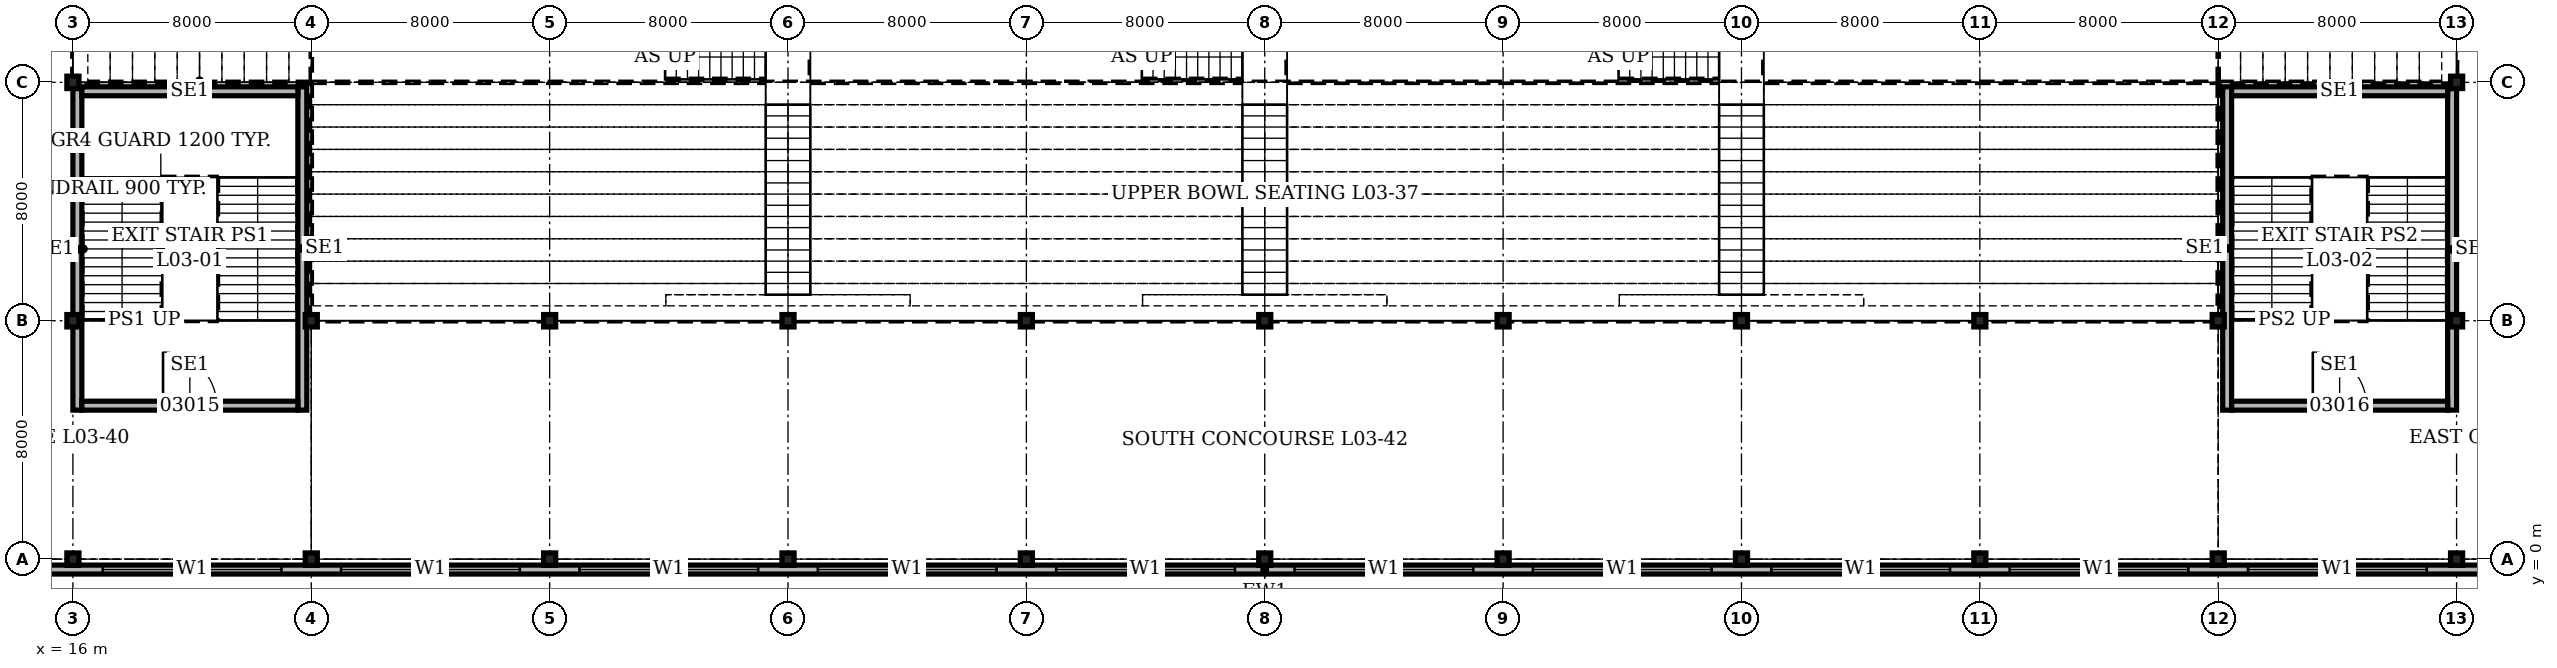
"""IFC4 building model, lengths in metres.
Left out: names, types, materials, properties, quantities, classifications, styles, units other than length and angle.
Written with IfcOpenShell. Run it as: python <this file> out.ifc"""

import sys

from ifc_helpers import new_model, si_unit, direction, frame, frame_2d, origin, origin_2d, place, context, subcontext, project, spatial, rectangle, i_section, extrude, element, fill, save


model = new_model("IFC4")
c1 = context("Model", 3, precision=1e-05, world=origin(), true_north=direction((0.0, 1.0)))
c2 = subcontext(c1, "Body", "Model", "MODEL_VIEW")
j1 = project(units=[si_unit("LENGTHUNIT", "METRE"), si_unit("PLANEANGLEUNIT", "RADIAN")], contexts=[c1])
p1 = place(None, origin())
s1 = spatial("IfcSite", under=j1, at=p1, CompositionType="ELEMENT")
p2 = place(p1, origin())
s2 = spatial("IfcBuilding", under=s1, at=p2, CompositionType="ELEMENT")
p3 = place(p2, frame((0.0, 0.0, 14.9)))
s3 = spatial("IfcBuildingStorey", under=s2, at=p3, CompositionType="ELEMENT", Elevation=14.9)
for number, where, z_axis, x_axis in (
    (1, (16.0, 0.0, 0.0), (0.0, 0.0, 1.0), (1.0, 0.0, 0.0)),
    (2, (16.0, 8.0, 0.0), (0.0, 0.0, 1.0), (1.0, 0.0, 0.0)),
    (3, (16.0, 16.0, 0.0), (0.0, 0.0, 1.0), (1.0, 0.0, 0.0)),
    (4, (24.0, 0.0, 0.0), (0.0, 0.0, 1.0), (1.0, 0.0, 0.0)),
    (5, (24.0, 8.0, 0.0), (0.0, 0.0, 1.0), (1.0, 0.0, 0.0)),
    (6, (32.0, 0.0, 0.0), (0.0, 0.0, 1.0), (1.0, 0.0, 0.0)),
    (7, (32.0, 8.0, 0.0), (0.0, 0.0, 1.0), (1.0, 0.0, 0.0)),
    (8, (40.0, 0.0, 0.0), (0.0, 0.0, 1.0), (1.0, 0.0, 0.0)),
    (9, (40.0, 8.0, 0.0), (0.0, 0.0, 1.0), (1.0, 0.0, 0.0)),
    (10, (48.0, 0.0, 0.0), (0.0, 0.0, 1.0), (1.0, 0.0, 0.0)),
    (11, (48.0, 8.0, 0.0), (0.0, 0.0, 1.0), (1.0, 0.0, 0.0)),
    (12, (56.0, 0.0, 0.0), (0.0, 0.0, 1.0), (1.0, 0.0, 0.0)),
    (13, (56.0, 8.0, 0.0), (0.0, 0.0, 1.0), (1.0, 0.0, 0.0)),
    (14, (64.0, 0.0, 0.0), (0.0, 0.0, 1.0), (1.0, 0.0, 0.0)),
    (15, (64.0, 8.0, 0.0), (0.0, 0.0, 1.0), (1.0, 0.0, 0.0)),
    (16, (72.0, 0.0, 0.0), (0.0, 0.0, 1.0), (1.0, 0.0, 0.0)),
    (17, (72.0, 8.0, 0.0), (0.0, 0.0, 1.0), (1.0, 0.0, 0.0)),
    (18, (80.0, 0.0, 0.0), (0.0, 0.0, 1.0), (1.0, 0.0, 0.0)),
    (19, (80.0, 8.0, 0.0), (0.0, 0.0, 1.0), (1.0, 0.0, 0.0)),
    (20, (88.0, 0.0, 0.0), (0.0, 0.0, 1.0), (1.0, 0.0, 0.0)),
    (21, (88.0, 8.0, 0.0), (0.0, 0.0, 1.0), (1.0, 0.0, 0.0)),
    (22, (96.0, 0.0, 0.0), (0.0, 0.0, 1.0), (1.0, 0.0, 0.0)),
    (23, (96.0, 8.0, 0.0), (0.0, 0.0, 1.0), (1.0, 0.0, 0.0)),
    (24, (96.0, 16.0, 0.0), (0.0, 0.0, 1.0), (1.0, 0.0, 0.0)),
):
    element("IfcColumn", number, at=place(p3, frame(where, z_axis=z_axis, x_axis=x_axis)), inside=s3, PredefinedType="COLUMN", context=c2, shape_type="SweptSolid", body=[
        extrude(i_section(OverallWidth=0.406, OverallDepth=0.417, WebThickness=0.03, FlangeThickness=0.048, at=origin_2d()), origin(), (0.0, 0.0, 1.0), 5.0),
    ])
p4 = place(p3, frame((-0.35, -0.35, 0.0), z_axis=(0.0, 0.0, 1.0), x_axis=(1.0, 0.0, 0.0)))
e25 = element("IfcWall", 25, at=p4, inside=s3, PredefinedType="SOLIDWALL", context=c2, shape_type="SweptSolid", body=[
    extrude(rectangle(XDim=112.7, YDim=0.3, at=frame_2d((56.35, 0.0))), origin(), (0.0, 0.0, 1.0), 5.0),
])
p5 = place(p4, frame((1.35, 0.0, 1.0)))
e26 = element("IfcOpeningElement", 26, at=p5, cuts=e25, PredefinedType="OPENING", context=c2, shape_type="SweptSolid", body=[
    extrude(rectangle(XDim=6.0, YDim=1.5, at=frame_2d((3.0, 0.75))), frame((0.0, 0.16, 0.0), z_axis=(0.0, -1.0, 0.0), x_axis=(1.0, 0.0, 0.0)), (0.0, 0.0, 1.0), 0.32),
])
p6 = place(p4, frame((9.35, 0.0, 1.0)))
e27 = element("IfcOpeningElement", 27, at=p6, cuts=e25, PredefinedType="OPENING", context=c2, shape_type="SweptSolid", body=[
    extrude(rectangle(XDim=6.0, YDim=1.5, at=frame_2d((3.0, 0.75))), frame((0.0, 0.16, 0.0), z_axis=(0.0, -1.0, 0.0), x_axis=(1.0, 0.0, 0.0)), (0.0, 0.0, 1.0), 0.32),
])
p7 = place(p4, frame((17.35, 0.0, 1.0)))
e28 = element("IfcOpeningElement", 28, at=p7, cuts=e25, PredefinedType="OPENING", context=c2, shape_type="SweptSolid", body=[
    extrude(rectangle(XDim=6.0, YDim=1.5, at=frame_2d((3.0, 0.75))), frame((0.0, 0.16, 0.0), z_axis=(0.0, -1.0, 0.0), x_axis=(1.0, 0.0, 0.0)), (0.0, 0.0, 1.0), 0.32),
])
p8 = place(p4, frame((25.35, 0.0, 1.0)))
e29 = element("IfcOpeningElement", 29, at=p8, cuts=e25, PredefinedType="OPENING", context=c2, shape_type="SweptSolid", body=[
    extrude(rectangle(XDim=6.0, YDim=1.5, at=frame_2d((3.0, 0.75))), frame((0.0, 0.16, 0.0), z_axis=(0.0, -1.0, 0.0), x_axis=(1.0, 0.0, 0.0)), (0.0, 0.0, 1.0), 0.32),
])
p9 = place(p4, frame((33.35, 0.0, 1.0)))
e30 = element("IfcOpeningElement", 30, at=p9, cuts=e25, PredefinedType="OPENING", context=c2, shape_type="SweptSolid", body=[
    extrude(rectangle(XDim=6.0, YDim=1.5, at=frame_2d((3.0, 0.75))), frame((0.0, 0.16, 0.0), z_axis=(0.0, -1.0, 0.0), x_axis=(1.0, 0.0, 0.0)), (0.0, 0.0, 1.0), 0.32),
])
p10 = place(p4, frame((41.35, 0.0, 1.0)))
e31 = element("IfcOpeningElement", 31, at=p10, cuts=e25, PredefinedType="OPENING", context=c2, shape_type="SweptSolid", body=[
    extrude(rectangle(XDim=6.0, YDim=1.5, at=frame_2d((3.0, 0.75))), frame((0.0, 0.16, 0.0), z_axis=(0.0, -1.0, 0.0), x_axis=(1.0, 0.0, 0.0)), (0.0, 0.0, 1.0), 0.32),
])
p11 = place(p4, frame((49.35, 0.0, 1.0)))
e32 = element("IfcOpeningElement", 32, at=p11, cuts=e25, PredefinedType="OPENING", context=c2, shape_type="SweptSolid", body=[
    extrude(rectangle(XDim=6.0, YDim=1.5, at=frame_2d((3.0, 0.75))), frame((0.0, 0.16, 0.0), z_axis=(0.0, -1.0, 0.0), x_axis=(1.0, 0.0, 0.0)), (0.0, 0.0, 1.0), 0.32),
])
p12 = place(p4, frame((57.35, 0.0, 1.0)))
e33 = element("IfcOpeningElement", 33, at=p12, cuts=e25, PredefinedType="OPENING", context=c2, shape_type="SweptSolid", body=[
    extrude(rectangle(XDim=6.0, YDim=1.5, at=frame_2d((3.0, 0.75))), frame((0.0, 0.16, 0.0), z_axis=(0.0, -1.0, 0.0), x_axis=(1.0, 0.0, 0.0)), (0.0, 0.0, 1.0), 0.32),
])
p13 = place(p4, frame((65.35, 0.0, 1.0)))
e34 = element("IfcOpeningElement", 34, at=p13, cuts=e25, PredefinedType="OPENING", context=c2, shape_type="SweptSolid", body=[
    extrude(rectangle(XDim=6.0, YDim=1.5, at=frame_2d((3.0, 0.75))), frame((0.0, 0.16, 0.0), z_axis=(0.0, -1.0, 0.0), x_axis=(1.0, 0.0, 0.0)), (0.0, 0.0, 1.0), 0.32),
])
p14 = place(p4, frame((73.35, 0.0, 1.0)))
e35 = element("IfcOpeningElement", 35, at=p14, cuts=e25, PredefinedType="OPENING", context=c2, shape_type="SweptSolid", body=[
    extrude(rectangle(XDim=6.0, YDim=1.5, at=frame_2d((3.0, 0.75))), frame((0.0, 0.16, 0.0), z_axis=(0.0, -1.0, 0.0), x_axis=(1.0, 0.0, 0.0)), (0.0, 0.0, 1.0), 0.32),
])
p15 = place(p4, frame((81.35, 0.0, 1.0)))
e36 = element("IfcOpeningElement", 36, at=p15, cuts=e25, PredefinedType="OPENING", context=c2, shape_type="SweptSolid", body=[
    extrude(rectangle(XDim=6.0, YDim=1.5, at=frame_2d((3.0, 0.75))), frame((0.0, 0.16, 0.0), z_axis=(0.0, -1.0, 0.0), x_axis=(1.0, 0.0, 0.0)), (0.0, 0.0, 1.0), 0.32),
])
p16 = place(p4, frame((89.35, 0.0, 1.0)))
e37 = element("IfcOpeningElement", 37, at=p16, cuts=e25, PredefinedType="OPENING", context=c2, shape_type="SweptSolid", body=[
    extrude(rectangle(XDim=6.0, YDim=1.5, at=frame_2d((3.0, 0.75))), frame((0.0, 0.16, 0.0), z_axis=(0.0, -1.0, 0.0), x_axis=(1.0, 0.0, 0.0)), (0.0, 0.0, 1.0), 0.32),
])
p17 = place(p4, frame((97.35, 0.0, 1.0)))
e38 = element("IfcOpeningElement", 38, at=p17, cuts=e25, PredefinedType="OPENING", context=c2, shape_type="SweptSolid", body=[
    extrude(rectangle(XDim=6.0, YDim=1.5, at=frame_2d((3.0, 0.75))), frame((0.0, 0.16, 0.0), z_axis=(0.0, -1.0, 0.0), x_axis=(1.0, 0.0, 0.0)), (0.0, 0.0, 1.0), 0.32),
])
p18 = place(p4, frame((105.35, 0.0, 1.0)))
e39 = element("IfcOpeningElement", 39, at=p18, cuts=e25, PredefinedType="OPENING", context=c2, shape_type="SweptSolid", body=[
    extrude(rectangle(XDim=6.0, YDim=1.5, at=frame_2d((3.0, 0.75))), frame((0.0, 0.16, 0.0), z_axis=(0.0, -1.0, 0.0), x_axis=(1.0, 0.0, 0.0)), (0.0, 0.0, 1.0), 0.32),
])
p19 = place(p3, frame((16.15, 5.0, 0.0), z_axis=(0.0, 0.0, 1.0), x_axis=(0.0, 1.0, 0.0)))
e40 = element("IfcWall", 40, at=p19, inside=s3, PredefinedType="SOLIDWALL", context=c2, shape_type="SweptSolid", body=[
    extrude(rectangle(XDim=10.792, YDim=0.3, at=frame_2d((5.396, 0.0))), origin(), (0.0, 0.0, 1.0), 4.8),
])
p20 = place(p3, frame((23.7, 5.0, 0.0), z_axis=(0.0, 0.0, 1.0), x_axis=(0.0, 1.0, 0.0)))
e41 = element("IfcWall", 41, at=p20, inside=s3, PredefinedType="SOLIDWALL", context=c2, shape_type="SweptSolid", body=[
    extrude(rectangle(XDim=10.85, YDim=0.3, at=frame_2d((5.425, 0.0))), origin(), (0.0, 0.0, 1.0), 4.8),
])
p21 = place(p3, frame((16.3, 5.15, 0.0), z_axis=(0.0, 0.0, 1.0), x_axis=(1.0, 0.0, 0.0)))
e42 = element("IfcWall", 42, at=p21, inside=s3, PredefinedType="SOLIDWALL", context=c2, shape_type="SweptSolid", body=[
    extrude(rectangle(XDim=7.25, YDim=0.3, at=frame_2d((3.625, 0.0))), origin(), (0.0, 0.0, 1.0), 4.8),
])
p22 = place(p21, frame((2.725, 0.0, 0.0)))
e43 = element("IfcOpeningElement", 43, at=p22, cuts=e42, PredefinedType="OPENING", context=c2, shape_type="SweptSolid", body=[
    extrude(rectangle(XDim=1.8, YDim=2.1, at=frame_2d((0.9, 1.05))), frame((0.0, 0.16, 0.0), z_axis=(0.0, -1.0, 0.0), x_axis=(1.0, 0.0, 0.0)), (0.0, 0.0, 1.0), 0.32),
])
p23 = place(p3, frame((16.3, 15.7, 0.0), z_axis=(0.0, 0.0, 1.0), x_axis=(1.0, 0.0, 0.0)))
e44 = element("IfcWall", 44, at=p23, inside=s3, PredefinedType="SOLIDWALL", context=c2, shape_type="SweptSolid", body=[
    extrude(rectangle(XDim=7.25, YDim=0.3, at=frame_2d((3.625, 0.0))), origin(), (0.0, 0.0, 1.0), 4.8),
])
p24 = place(p3, frame((88.3, 5.0, 0.0), z_axis=(0.0, 0.0, 1.0), x_axis=(0.0, 1.0, 0.0)))
e45 = element("IfcWall", 45, at=p24, inside=s3, PredefinedType="SOLIDWALL", context=c2, shape_type="SweptSolid", body=[
    extrude(rectangle(XDim=10.85, YDim=0.3, at=frame_2d((5.425, 0.0))), origin(), (0.0, 0.0, 1.0), 4.8),
])
p25 = place(p3, frame((95.85, 5.0, 0.0), z_axis=(0.0, 0.0, 1.0), x_axis=(0.0, 1.0, 0.0)))
e46 = element("IfcWall", 46, at=p25, inside=s3, PredefinedType="SOLIDWALL", context=c2, shape_type="SweptSolid", body=[
    extrude(rectangle(XDim=10.792, YDim=0.3, at=frame_2d((5.396, 0.0))), origin(), (0.0, 0.0, 1.0), 4.8),
])
p26 = place(p3, frame((88.45, 5.15, 0.0), z_axis=(0.0, 0.0, 1.0), x_axis=(1.0, 0.0, 0.0)))
e47 = element("IfcWall", 47, at=p26, inside=s3, PredefinedType="SOLIDWALL", context=c2, shape_type="SweptSolid", body=[
    extrude(rectangle(XDim=7.25, YDim=0.3, at=frame_2d((3.625, 0.0))), origin(), (0.0, 0.0, 1.0), 4.8),
])
p27 = place(p26, frame((2.725, 0.0, 0.0)))
e48 = element("IfcOpeningElement", 48, at=p27, cuts=e47, PredefinedType="OPENING", context=c2, shape_type="SweptSolid", body=[
    extrude(rectangle(XDim=1.8, YDim=2.1, at=frame_2d((0.9, 1.05))), frame((0.0, 0.16, 0.0), z_axis=(0.0, -1.0, 0.0), x_axis=(1.0, 0.0, 0.0)), (0.0, 0.0, 1.0), 0.32),
])
p28 = place(p3, frame((88.45, 15.7, 0.0), z_axis=(0.0, 0.0, 1.0), x_axis=(1.0, 0.0, 0.0)))
e49 = element("IfcWall", 49, at=p28, inside=s3, PredefinedType="SOLIDWALL", context=c2, shape_type="SweptSolid", body=[
    extrude(rectangle(XDim=7.25, YDim=0.3, at=frame_2d((3.625, 0.0))), origin(), (0.0, 0.0, 1.0), 4.8),
])
p29 = place(p7, origin())
e50 = element("IfcWindow", 50, at=p29, inside=s3, PartitioningType="SINGLE_PANEL", PredefinedType="WINDOW", context=c2, shape_type="SweptSolid", body=[
    extrude(rectangle(XDim=6.0, YDim=1.5, at=frame_2d((3.0, 0.75))), frame((0.0, 0.03, 0.0), z_axis=(0.0, -1.0, 0.0), x_axis=(1.0, 0.0, 0.0)), (0.0, 0.0, 1.0), 0.06),
])
fill(e28, e50)
p30 = place(p8, origin())
e51 = element("IfcWindow", 51, at=p30, inside=s3, PartitioningType="SINGLE_PANEL", PredefinedType="WINDOW", context=c2, shape_type="SweptSolid", body=[
    extrude(rectangle(XDim=6.0, YDim=1.5, at=frame_2d((3.0, 0.75))), frame((0.0, 0.03, 0.0), z_axis=(0.0, -1.0, 0.0), x_axis=(1.0, 0.0, 0.0)), (0.0, 0.0, 1.0), 0.06),
])
fill(e29, e51)
p31 = place(p9, origin())
e52 = element("IfcWindow", 52, at=p31, inside=s3, PartitioningType="SINGLE_PANEL", PredefinedType="WINDOW", context=c2, shape_type="SweptSolid", body=[
    extrude(rectangle(XDim=6.0, YDim=1.5, at=frame_2d((3.0, 0.75))), frame((0.0, 0.03, 0.0), z_axis=(0.0, -1.0, 0.0), x_axis=(1.0, 0.0, 0.0)), (0.0, 0.0, 1.0), 0.06),
])
fill(e30, e52)
p32 = place(p10, origin())
e53 = element("IfcWindow", 53, at=p32, inside=s3, PartitioningType="SINGLE_PANEL", PredefinedType="WINDOW", context=c2, shape_type="SweptSolid", body=[
    extrude(rectangle(XDim=6.0, YDim=1.5, at=frame_2d((3.0, 0.75))), frame((0.0, 0.03, 0.0), z_axis=(0.0, -1.0, 0.0), x_axis=(1.0, 0.0, 0.0)), (0.0, 0.0, 1.0), 0.06),
])
fill(e31, e53)
p33 = place(p11, origin())
e54 = element("IfcWindow", 54, at=p33, inside=s3, PartitioningType="SINGLE_PANEL", PredefinedType="WINDOW", context=c2, shape_type="SweptSolid", body=[
    extrude(rectangle(XDim=6.0, YDim=1.5, at=frame_2d((3.0, 0.75))), frame((0.0, 0.03, 0.0), z_axis=(0.0, -1.0, 0.0), x_axis=(1.0, 0.0, 0.0)), (0.0, 0.0, 1.0), 0.06),
])
fill(e32, e54)
p34 = place(p12, origin())
e55 = element("IfcWindow", 55, at=p34, inside=s3, PartitioningType="SINGLE_PANEL", PredefinedType="WINDOW", context=c2, shape_type="SweptSolid", body=[
    extrude(rectangle(XDim=6.0, YDim=1.5, at=frame_2d((3.0, 0.75))), frame((0.0, 0.03, 0.0), z_axis=(0.0, -1.0, 0.0), x_axis=(1.0, 0.0, 0.0)), (0.0, 0.0, 1.0), 0.06),
])
fill(e33, e55)
p35 = place(p13, origin())
e56 = element("IfcWindow", 56, at=p35, inside=s3, PartitioningType="SINGLE_PANEL", PredefinedType="WINDOW", context=c2, shape_type="SweptSolid", body=[
    extrude(rectangle(XDim=6.0, YDim=1.5, at=frame_2d((3.0, 0.75))), frame((0.0, 0.03, 0.0), z_axis=(0.0, -1.0, 0.0), x_axis=(1.0, 0.0, 0.0)), (0.0, 0.0, 1.0), 0.06),
])
fill(e34, e56)
p36 = place(p14, origin())
e57 = element("IfcWindow", 57, at=p36, inside=s3, PartitioningType="SINGLE_PANEL", PredefinedType="WINDOW", context=c2, shape_type="SweptSolid", body=[
    extrude(rectangle(XDim=6.0, YDim=1.5, at=frame_2d((3.0, 0.75))), frame((0.0, 0.03, 0.0), z_axis=(0.0, -1.0, 0.0), x_axis=(1.0, 0.0, 0.0)), (0.0, 0.0, 1.0), 0.06),
])
fill(e35, e57)
p37 = place(p15, origin())
e58 = element("IfcWindow", 58, at=p37, inside=s3, PartitioningType="SINGLE_PANEL", PredefinedType="WINDOW", context=c2, shape_type="SweptSolid", body=[
    extrude(rectangle(XDim=6.0, YDim=1.5, at=frame_2d((3.0, 0.75))), frame((0.0, 0.03, 0.0), z_axis=(0.0, -1.0, 0.0), x_axis=(1.0, 0.0, 0.0)), (0.0, 0.0, 1.0), 0.06),
])
fill(e36, e58)
p38 = place(p16, origin())
e59 = element("IfcWindow", 59, at=p38, inside=s3, PartitioningType="SINGLE_PANEL", PredefinedType="WINDOW", context=c2, shape_type="SweptSolid", body=[
    extrude(rectangle(XDim=6.0, YDim=1.5, at=frame_2d((3.0, 0.75))), frame((0.0, 0.03, 0.0), z_axis=(0.0, -1.0, 0.0), x_axis=(1.0, 0.0, 0.0)), (0.0, 0.0, 1.0), 0.06),
])
fill(e37, e59)
p39 = place(p22, origin())
e60 = element("IfcDoor", 60, at=p39, inside=s3, OperationType="DOUBLE_DOOR_SINGLE_SWING", PredefinedType="DOOR", context=c2, shape_type="SweptSolid", body=[
    extrude(rectangle(XDim=1.8, YDim=2.1, at=frame_2d((0.9, 1.05))), frame((0.0, 0.15, 0.0), z_axis=(0.0, -1.0, 0.0), x_axis=(1.0, 0.0, 0.0)), (0.0, 0.0, 1.0), 0.3),
])
fill(e43, e60)
p40 = place(p27, origin())
e61 = element("IfcDoor", 61, at=p40, inside=s3, OperationType="DOUBLE_DOOR_SINGLE_SWING", PredefinedType="DOOR", context=c2, shape_type="SweptSolid", body=[
    extrude(rectangle(XDim=1.8, YDim=2.1, at=frame_2d((0.9, 1.05))), frame((0.0, 0.15, 0.0), z_axis=(0.0, -1.0, 0.0), x_axis=(1.0, 0.0, 0.0)), (0.0, 0.0, 1.0), 0.3),
])
fill(e48, e61)
save(model, sys.argv[1])
